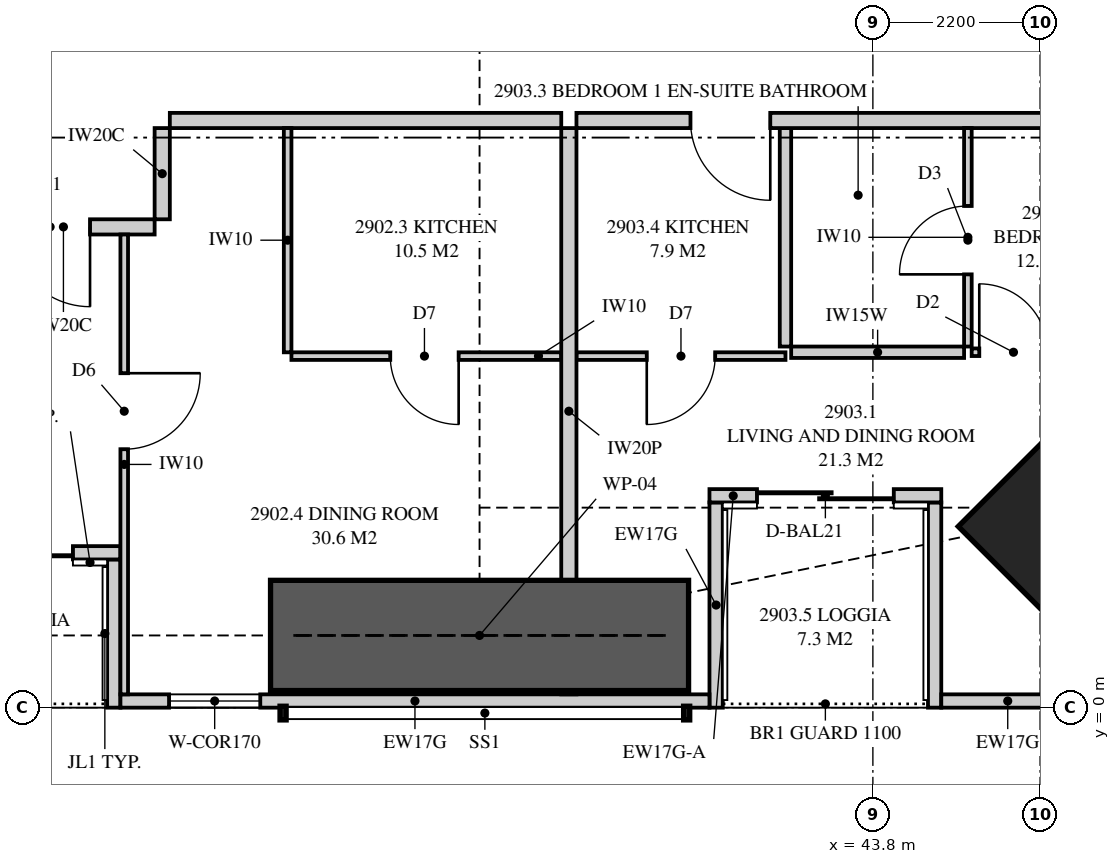
"""IFC4 building model, lengths in metres.
Left out: names, types, materials, properties, quantities, classifications, styles, units other than length and angle.
Written with IfcOpenShell. Run it as: python <this file> out.ifc"""

import sys

from ifc_helpers import new_model, si_unit, direction, frame, frame_2d, origin, origin_2d, place, context, subcontext, project, spatial, polyline, rectangle, outline, extrude, element, fill, save


model = new_model("IFC4")
c1 = context("Model", 3, precision=1e-05, world=origin(), true_north=direction((0.0, 1.0)))
c2 = subcontext(c1, "Body", "Model", "MODEL_VIEW")
j1 = project(units=[si_unit("LENGTHUNIT", "METRE"), si_unit("PLANEANGLEUNIT", "RADIAN")], contexts=[c1])
p1 = place(None, origin())
s1 = spatial("IfcSite", under=j1, at=p1, CompositionType="ELEMENT")
p2 = place(p1, origin())
s2 = spatial("IfcBuilding", under=s1, at=p2, CompositionType="ELEMENT")
p3 = place(p2, frame((0.0, 0.0, 108.2)))
s3 = spatial("IfcBuildingStorey", under=s2, at=p3, CompositionType="ELEMENT", Elevation=108.2)
p4 = place(p3, frame((46.869, 2.631, 0.0), z_axis=(0.0, 0.0, 1.0), x_axis=(-0.707106781187, 0.707106781187, 0.0)))
e1 = element("IfcColumn", 1, at=p4, inside=s3, PredefinedType="COLUMN", context=c2, shape_type="SweptSolid", body=[
    extrude(rectangle(XDim=2.4, YDim=3.1, at=origin_2d()), origin(), (0.0, 0.0, 1.0), 3.35),
])
p5 = place(p3, frame((33.9, 0.087, 0.0), z_axis=(0.0, 0.0, 1.0), x_axis=(1.0, 0.0, 0.0)))
e2 = element("IfcWall", 2, at=p5, inside=s3, PredefinedType="SOLIDWALL", context=c2, shape_type="SweptSolid", body=[
    extrude(outline(polyline([(0.0, 0.0), (7.75, 0.0), (7.75, 3.11), (4.928, 3.11), (4.928, 2.15), (4.883, 2.15), (4.883, 3.11), (4.725, 3.11), (4.725, 2.15), (0.0, 2.15), (0.0, 0.0)])), frame((0.0, 0.087, 0.0), z_axis=(0.0, -1.0, 0.0), x_axis=(1.0, 0.0, 0.0)), (0.0, 0.0, 1.0), 0.175),
])
p6 = place(p5, frame((0.64, 0.0, 0.4)))
e3 = element("IfcOpeningElement", 3, at=p6, cuts=e2, PredefinedType="OPENING", context=c2, shape_type="SweptSolid", body=[
    extrude(rectangle(XDim=1.2, YDim=1.7, at=frame_2d((0.6, 0.85))), frame((0.0, 0.097, 0.0), z_axis=(0.0, -1.0, 0.0), x_axis=(1.0, 0.0, 0.0)), (0.0, 0.0, 1.0), 0.195),
])
p7 = place(p3, frame((44.7, 0.087, 0.0), z_axis=(0.0, 0.0, 1.0), x_axis=(1.0, 0.0, 0.0)))
e4 = element("IfcWall", 4, at=p7, inside=s3, PredefinedType="SOLIDWALL", context=c2, shape_type="SweptSolid", body=[
    extrude(rectangle(XDim=1.749, YDim=0.175, at=frame_2d((0.875, 0.0))), origin(), (0.0, 0.0, 1.0), 3.11),
])
p8 = place(p3, frame((30.85, 2.038, 0.0), z_axis=(0.0, 0.0, 1.0), x_axis=(1.0, 0.0, 0.0)))
e5 = element("IfcWall", 5, at=p8, inside=s3, PredefinedType="SOLIDWALL", context=c2, shape_type="SweptSolid", body=[
    extrude(rectangle(XDim=3.05, YDim=0.175, at=frame_2d((1.525, 0.0))), origin(), (0.0, 0.0, 1.0), 3.11),
])
p9 = place(p8, frame((0.625, 0.0, 0.0)))
e6 = element("IfcOpeningElement", 6, at=p9, cuts=e5, PredefinedType="OPENING", context=c2, shape_type="SweptSolid", body=[
    extrude(rectangle(XDim=1.8, YDim=2.1, at=frame_2d((0.9, 1.05))), frame((0.0, 0.097, 0.0), z_axis=(0.0, -1.0, 0.0), x_axis=(1.0, 0.0, 0.0)), (0.0, 0.0, 1.0), 0.195),
])
p10 = place(p3, frame((33.812, 0.0, 0.0), z_axis=(0.0, 0.0, 1.0), x_axis=(0.0, 1.0, 0.0)))
e7 = element("IfcWall", 7, at=p10, inside=s3, PredefinedType="SOLIDWALL", context=c2, shape_type="SweptSolid", body=[
    extrude(outline(polyline([(0.0, 0.0), (1.95, 0.0), (1.95, 3.11), (1.75, 3.11), (1.75, 2.15), (0.15, 2.15), (0.15, 3.11), (0.0, 3.11), (0.0, 0.0)])), frame((0.0, 0.087, 0.0), z_axis=(0.0, -1.0, 0.0), x_axis=(1.0, 0.0, 0.0)), (0.0, 0.0, 1.0), 0.175),
])
p11 = place(p3, frame((41.65, 2.788, 0.0), z_axis=(0.0, 0.0, 1.0), x_axis=(1.0, 0.0, 0.0)))
e8 = element("IfcWall", 8, at=p11, inside=s3, PredefinedType="SOLIDWALL", context=c2, shape_type="SweptSolid", body=[
    extrude(rectangle(XDim=0.625, YDim=0.175, at=frame_2d((0.312, 0.0))), origin(), (0.0, 0.0, 1.0), 2.51),
])
p12 = place(p3, frame((42.275, 2.788, 0.0), z_axis=(0.0, 0.0, 1.0), x_axis=(1.0, 0.0, 0.0)))
e9 = element("IfcWall", 9, at=p12, inside=s3, PredefinedType="SOLIDWALL", context=c2, shape_type="SweptSolid", body=[
    extrude(rectangle(XDim=2.425, YDim=0.175, at=frame_2d((1.212, 0.0))), origin(), (0.0, 0.0, 1.0), 2.15),
])
p13 = place(p12, origin())
e10 = element("IfcOpeningElement", 10, at=p13, cuts=e9, PredefinedType="OPENING", context=c2, shape_type="SweptSolid", body=[
    extrude(rectangle(XDim=1.8, YDim=2.1, at=frame_2d((0.9, 1.05))), frame((0.0, 0.097, 0.0), z_axis=(0.0, -1.0, 0.0), x_axis=(1.0, 0.0, 0.0)), (0.0, 0.0, 1.0), 0.195),
])
p14 = place(p3, frame((41.738, 0.0, 0.0), z_axis=(0.0, 0.0, 1.0), x_axis=(0.0, 1.0, 0.0)))
e11 = element("IfcWall", 11, at=p14, inside=s3, PredefinedType="SOLIDWALL", context=c2, shape_type="SweptSolid", body=[
    extrude(outline(polyline([(0.0, 0.0), (2.7, 0.0), (2.7, 2.51), (2.419, 2.51), (2.419, 2.15), (0.75, 2.15), (0.75, 3.11), (0.0, 3.11), (0.0, 0.0)])), frame((0.0, 0.087, 0.0), z_axis=(0.0, -1.0, 0.0), x_axis=(1.0, 0.0, 0.0)), (0.0, 0.0, 1.0), 0.175),
])
p15 = place(p3, frame((44.613, 0.0, 0.0), z_axis=(0.0, 0.0, 1.0), x_axis=(0.0, 1.0, 0.0)))
e12 = element("IfcWall", 12, at=p15, inside=s3, PredefinedType="SOLIDWALL", context=c2, shape_type="SweptSolid", body=[
    extrude(outline(polyline([(0.0, 0.0), (2.7, 0.0), (2.7, 2.15), (1.337, 2.15), (1.337, 3.11), (0.0, 3.11), (0.0, 0.0)])), frame((0.0, 0.087, 0.0), z_axis=(0.0, -1.0, 0.0), x_axis=(1.0, 0.0, 0.0)), (0.0, 0.0, 1.0), 0.175),
])
p16 = place(p3, frame((39.8, 0.175, 0.0), z_axis=(0.0, 0.0, 1.0), x_axis=(0.0, 1.0, 0.0)))
e13 = element("IfcWall", 13, at=p16, inside=s3, PredefinedType="PARTITIONING", context=c2, shape_type="SweptSolid", body=[
    extrude(outline(polyline([(0.086, 3.11), (0.0, 3.11), (0.0, 0.0), (0.529, 0.0), (0.529, 0.701), (1.021, 0.701), (1.021, 0.0), (7.45, 0.0), (7.45, 3.11), (3.766, 3.11), (3.766, 2.51), (1.943, 2.51), (1.943, 2.15), (1.021, 2.15), (1.021, 1.449), (0.529, 1.449), (0.529, 2.15), (0.086, 2.15), (0.086, 3.11)])), frame((0.0, 0.1, 0.0), z_axis=(0.0, -1.0, 0.0), x_axis=(1.0, 0.0, 0.0)), (0.0, 0.0, 1.0), 0.2),
])
p17 = place(p3, frame((36.15, 4.625, 0.0), z_axis=(0.0, 0.0, 1.0), x_axis=(1.0, 0.0, 0.0)))
e14 = element("IfcWall", 14, at=p17, inside=s3, PredefinedType="PARTITIONING", context=c2, shape_type="SweptSolid", body=[
    extrude(outline(polyline([(0.0, 0.0), (3.55, 0.0), (3.55, 3.11), (2.762, 3.11), (2.762, 2.541), (2.188, 2.541), (2.188, 3.11), (0.0, 3.11), (0.0, 0.0)])), frame((0.0, 0.05, 0.0), z_axis=(0.0, -1.0, 0.0), x_axis=(1.0, 0.0, 0.0)), (0.0, 0.0, 1.0), 0.1),
])
p18 = place(p17, frame((1.3, 0.0, 0.0)))
e15 = element("IfcOpeningElement", 15, at=p18, cuts=e14, PredefinedType="OPENING", context=c2, shape_type="SweptSolid", body=[
    extrude(rectangle(XDim=0.9, YDim=2.1, at=frame_2d((0.45, 1.05))), frame((0.0, 0.06, 0.0), z_axis=(0.0, -1.0, 0.0), x_axis=(1.0, 0.0, 0.0)), (0.0, 0.0, 1.0), 0.12),
])
p19 = place(p3, frame((36.1, 4.675, 0.0), z_axis=(0.0, 0.0, 1.0), x_axis=(0.0, 1.0, 0.0)))
e16 = element("IfcWall", 16, at=p19, inside=s3, PredefinedType="PARTITIONING", context=c2, shape_type="SweptSolid", body=[
    extrude(rectangle(XDim=2.95, YDim=0.1, at=frame_2d((1.475, 0.0))), origin(), (0.0, 0.0, 1.0), 3.11),
])
p20 = place(p3, frame((33.95, 0.175, 0.0), z_axis=(0.0, 0.0, 1.0), x_axis=(0.0, 1.0, 0.0)))
e17 = element("IfcWall", 17, at=p20, inside=s3, PredefinedType="PARTITIONING", context=c2, shape_type="SweptSolid", body=[
    extrude(outline(polyline([(0.0, 0.0), (6.05, 0.0), (6.05, 3.11), (1.635, 3.11), (1.635, 2.15), (0.0, 2.15), (0.0, 3.11), (0.0, 0.0)])), frame((0.0, 0.05, 0.0), z_axis=(0.0, -1.0, 0.0), x_axis=(1.0, 0.0, 0.0)), (0.0, 0.0, 1.0), 0.1),
])
p21 = place(p20, frame((3.225, 0.0, 0.0)))
e18 = element("IfcOpeningElement", 18, at=p21, cuts=e17, PredefinedType="OPENING", context=c2, shape_type="SweptSolid", body=[
    extrude(rectangle(XDim=1.0, YDim=2.1, at=frame_2d((0.5, 1.05))), frame((0.0, 0.06, 0.0), z_axis=(0.0, -1.0, 0.0), x_axis=(1.0, 0.0, 0.0)), (0.0, 0.0, 1.0), 0.12),
])
p22 = place(p3, frame((39.9, 7.725, 0.0), z_axis=(0.0, 0.0, 1.0), x_axis=(1.0, 0.0, 0.0)))
e19 = element("IfcWall", 19, at=p22, inside=s3, PredefinedType="PARTITIONING", context=c2, shape_type="SweptSolid", body=[
    extrude(rectangle(XDim=6.125, YDim=0.2, at=frame_2d((3.062, 0.0))), origin(), (0.0, 0.0, 1.0), 3.11),
])
p23 = place(p22, frame((1.5, 0.0, 0.0)))
e20 = element("IfcOpeningElement", 20, at=p23, cuts=e19, PredefinedType="OPENING", context=c2, shape_type="SweptSolid", body=[
    extrude(rectangle(XDim=1.05, YDim=2.2, at=frame_2d((0.525, 1.1))), frame((0.0, 0.11, 0.0), z_axis=(0.0, -1.0, 0.0), x_axis=(1.0, 0.0, 0.0)), (0.0, 0.0, 1.0), 0.22),
])
p24 = place(p3, frame((45.05, 4.751, 0.0), z_axis=(0.0, 0.0, 1.0), x_axis=(0.0, 1.0, 0.0)))
e21 = element("IfcWall", 21, at=p24, inside=s3, PredefinedType="PARTITIONING", context=c2, shape_type="SweptSolid", body=[
    extrude(rectangle(XDim=2.874, YDim=0.1, at=frame_2d((1.437, 0.0))), origin(), (0.0, 0.0, 1.0), 3.11),
])
p25 = place(p24, frame((0.949, 0.0, 0.0)))
e22 = element("IfcOpeningElement", 22, at=p25, cuts=e21, PredefinedType="OPENING", context=c2, shape_type="SweptSolid", body=[
    extrude(rectangle(XDim=0.9, YDim=2.1, at=frame_2d((0.45, 1.05))), frame((0.0, 0.06, 0.0), z_axis=(0.0, -1.0, 0.0), x_axis=(1.0, 0.0, 0.0)), (0.0, 0.0, 1.0), 0.12),
])
p26 = place(p3, frame((45.1, 4.676, 0.0), z_axis=(0.0, 0.0, 1.0), x_axis=(1.0, 0.0, 0.0)))
e23 = element("IfcWall", 23, at=p26, inside=s3, PredefinedType="PARTITIONING", context=c2, shape_type="SweptSolid", body=[
    extrude(outline(polyline([(0.0, 0.0), (4.4, 0.0), (4.4, 3.11), (2.971, 3.11), (2.971, 2.15), (1.229, 2.15), (1.229, 3.11), (0.0, 3.11), (0.0, 0.0)])), frame((0.0, 0.05, 0.0), z_axis=(0.0, -1.0, 0.0), x_axis=(1.0, 0.0, 0.0)), (0.0, 0.0, 1.0), 0.1),
])
p27 = place(p26, frame((0.1, 0.0, 0.0)))
e24 = element("IfcOpeningElement", 24, at=p27, cuts=e23, PredefinedType="OPENING", context=c2, shape_type="SweptSolid", body=[
    extrude(rectangle(XDim=0.9, YDim=2.1, at=frame_2d((0.45, 1.05))), frame((0.0, 0.06, 0.0), z_axis=(0.0, -1.0, 0.0), x_axis=(1.0, 0.0, 0.0)), (0.0, 0.0, 1.0), 0.12),
])
p28 = place(p3, frame((42.725, 4.676, 0.0), z_axis=(0.0, 0.0, 1.0), x_axis=(1.0, 0.0, 0.0)))
e25 = element("IfcWall", 25, at=p28, inside=s3, PredefinedType="PLUMBINGWALL", context=c2, shape_type="SweptSolid", body=[
    extrude(rectangle(XDim=2.275, YDim=0.15, at=frame_2d((1.137, 0.0))), origin(), (0.0, 0.0, 1.0), 3.11),
])
p29 = place(p3, frame((42.65, 4.751, 0.0), z_axis=(0.0, 0.0, 1.0), x_axis=(0.0, 1.0, 0.0)))
e26 = element("IfcWall", 26, at=p29, inside=s3, PredefinedType="PLUMBINGWALL", context=c2, shape_type="SweptSolid", body=[
    extrude(rectangle(XDim=2.874, YDim=0.15, at=frame_2d((1.437, 0.0))), origin(), (0.0, 0.0, 1.0), 3.11),
])
p30 = place(p3, frame((39.9, 4.625, 0.0), z_axis=(0.0, 0.0, 1.0), x_axis=(1.0, 0.0, 0.0)))
e27 = element("IfcWall", 27, at=p30, inside=s3, PredefinedType="PARTITIONING", context=c2, shape_type="SweptSolid", body=[
    extrude(rectangle(XDim=2.75, YDim=0.1, at=frame_2d((1.375, 0.0))), origin(), (0.0, 0.0, 1.0), 3.11),
])
p31 = place(p30, frame((0.925, 0.0, 0.0)))
e28 = element("IfcOpeningElement", 28, at=p31, cuts=e27, PredefinedType="OPENING", context=c2, shape_type="SweptSolid", body=[
    extrude(rectangle(XDim=0.9, YDim=2.1, at=frame_2d((0.45, 1.05))), frame((0.0, 0.06, 0.0), z_axis=(0.0, -1.0, 0.0), x_axis=(1.0, 0.0, 0.0)), (0.0, 0.0, 1.0), 0.12),
])
p32 = place(p3, frame((34.55, 7.725, 0.0), z_axis=(0.0, 0.0, 1.0), x_axis=(1.0, 0.0, 0.0)))
e29 = element("IfcWall", 29, at=p32, inside=s3, PredefinedType="PARTITIONING", context=c2, shape_type="SweptSolid", body=[
    extrude(outline(polyline([(0.0, 0.0), (5.15, 0.0), (5.15, 3.11), (4.412, 3.11), (4.412, 2.541), (3.738, 2.541), (3.738, 3.11), (0.0, 3.11), (0.0, 0.0)])), frame((0.0, 0.1, 0.0), z_axis=(0.0, -1.0, 0.0), x_axis=(1.0, 0.0, 0.0)), (0.0, 0.0, 1.0), 0.2),
])
p33 = place(p3, frame((31.95, 6.325, 0.0), z_axis=(0.0, 0.0, 1.0), x_axis=(1.0, 0.0, 0.0)))
e30 = element("IfcWall", 30, at=p33, inside=s3, PredefinedType="PARTITIONING", context=c2, shape_type="SweptSolid", body=[
    extrude(rectangle(XDim=2.4, YDim=0.2, at=frame_2d((1.2, 0.0))), origin(), (0.0, 0.0, 1.0), 3.11),
])
p34 = place(p33, frame((0.5, 0.0, 0.0)))
e31 = element("IfcOpeningElement", 31, at=p34, cuts=e30, PredefinedType="OPENING", context=c2, shape_type="SweptSolid", body=[
    extrude(rectangle(XDim=1.05, YDim=2.2, at=frame_2d((0.525, 1.1))), frame((0.0, 0.11, 0.0), z_axis=(0.0, -1.0, 0.0), x_axis=(1.0, 0.0, 0.0)), (0.0, 0.0, 1.0), 0.22),
])
p35 = place(p3, frame((34.45, 7.625, 0.0), z_axis=(0.0, 0.0, 1.0), x_axis=(0.0, -1.0, 0.0)))
e32 = element("IfcWall", 32, at=p35, inside=s3, PredefinedType="PARTITIONING", context=c2, shape_type="SweptSolid", body=[
    extrude(rectangle(XDim=1.2, YDim=0.2, at=frame_2d((0.6, 0.0))), origin(), (0.0, 0.0, 1.0), 3.11),
])
p36 = place(p3, frame((35.875, 0.95, 0.0), z_axis=(0.0, 0.0, 1.0), x_axis=(1.0, 0.0, 0.0)))
e33 = element("IfcWall", 33, at=p36, inside=s3, PredefinedType="SHEAR", context=c2, shape_type="SweptSolid", body=[
    extrude(rectangle(XDim=5.5, YDim=1.45, at=frame_2d((2.75, 0.0))), origin(), (0.0, 0.0, 1.0), 3.35),
])
p37 = place(p9, origin())
e34 = element("IfcDoor", 34, at=p37, inside=s3, OperationType="SLIDING_TO_LEFT", PredefinedType="DOOR", context=c2, shape_type="SweptSolid", body=[
    extrude(rectangle(XDim=1.8, YDim=2.1, at=frame_2d((0.9, 1.05))), frame((0.0, 0.025, 0.0), z_axis=(0.0, -1.0, 0.0), x_axis=(1.0, 0.0, 0.0)), (0.0, 0.0, 1.0), 0.05),
])
fill(e6, e34)
p38 = place(p6, origin())
e35 = element("IfcWindow", 35, at=p38, inside=s3, PartitioningType="SINGLE_PANEL", PredefinedType="WINDOW", context=c2, shape_type="SweptSolid", body=[
    extrude(rectangle(XDim=1.2, YDim=1.7, at=frame_2d((0.6, 0.85))), frame((0.0, 0.03, 0.0), z_axis=(0.0, -1.0, 0.0), x_axis=(1.0, 0.0, 0.0)), (0.0, 0.0, 1.0), 0.06),
])
fill(e3, e35)
p39 = place(p13, origin())
e36 = element("IfcDoor", 36, at=p39, inside=s3, OperationType="SLIDING_TO_LEFT", PredefinedType="DOOR", context=c2, shape_type="SweptSolid", body=[
    extrude(rectangle(XDim=1.8, YDim=2.1, at=frame_2d((0.9, 1.05))), frame((0.0, 0.025, 0.0), z_axis=(0.0, -1.0, 0.0), x_axis=(1.0, 0.0, 0.0)), (0.0, 0.0, 1.0), 0.05),
])
fill(e10, e36)
p40 = place(p34, frame((1.05, 0.0, 0.0), z_axis=(0.0, 0.0, 1.0), x_axis=(-1.0, 0.0, 0.0)))
e37 = element("IfcDoor", 37, at=p40, inside=s3, OperationType="SINGLE_SWING_LEFT", PredefinedType="DOOR", context=c2, shape_type="SweptSolid", body=[
    extrude(rectangle(XDim=1.05, YDim=2.2, at=frame_2d((0.525, 1.1))), frame((0.0, 0.025, 0.0), z_axis=(0.0, -1.0, 0.0), x_axis=(1.0, 0.0, 0.0)), (0.0, 0.0, 1.0), 0.05),
])
fill(e31, e37)
p41 = place(p18, frame((0.9, 0.0, 0.0), z_axis=(0.0, 0.0, 1.0), x_axis=(-1.0, 0.0, 0.0)))
e38 = element("IfcDoor", 38, at=p41, inside=s3, OperationType="SINGLE_SWING_LEFT", PredefinedType="DOOR", context=c2, shape_type="SweptSolid", body=[
    extrude(rectangle(XDim=0.9, YDim=2.1, at=frame_2d((0.45, 1.05))), frame((0.0, 0.025, 0.0), z_axis=(0.0, -1.0, 0.0), x_axis=(1.0, 0.0, 0.0)), (0.0, 0.0, 1.0), 0.05),
])
fill(e15, e38)
p42 = place(p21, frame((1.0, 0.0, 0.0), z_axis=(0.0, 0.0, 1.0), x_axis=(-1.0, 0.0, 0.0)))
e39 = element("IfcDoor", 39, at=p42, inside=s3, OperationType="SINGLE_SWING_LEFT", PredefinedType="DOOR", context=c2, shape_type="SweptSolid", body=[
    extrude(rectangle(XDim=1.0, YDim=2.1, at=frame_2d((0.5, 1.05))), frame((0.0, 0.025, 0.0), z_axis=(0.0, -1.0, 0.0), x_axis=(1.0, 0.0, 0.0)), (0.0, 0.0, 1.0), 0.05),
])
fill(e18, e39)
p43 = place(p23, frame((1.05, 0.0, 0.0), z_axis=(0.0, 0.0, 1.0), x_axis=(-1.0, 0.0, 0.0)))
e40 = element("IfcDoor", 40, at=p43, inside=s3, OperationType="SINGLE_SWING_LEFT", PredefinedType="DOOR", context=c2, shape_type="SweptSolid", body=[
    extrude(rectangle(XDim=1.05, YDim=2.2, at=frame_2d((0.525, 1.1))), frame((0.0, 0.025, 0.0), z_axis=(0.0, -1.0, 0.0), x_axis=(1.0, 0.0, 0.0)), (0.0, 0.0, 1.0), 0.05),
])
fill(e20, e40)
p44 = place(p27, origin())
e41 = element("IfcDoor", 41, at=p44, inside=s3, OperationType="SINGLE_SWING_LEFT", PredefinedType="DOOR", context=c2, shape_type="SweptSolid", body=[
    extrude(rectangle(XDim=0.9, YDim=2.1, at=frame_2d((0.45, 1.05))), frame((0.0, 0.025, 0.0), z_axis=(0.0, -1.0, 0.0), x_axis=(1.0, 0.0, 0.0)), (0.0, 0.0, 1.0), 0.05),
])
fill(e24, e41)
p45 = place(p25, origin())
e42 = element("IfcDoor", 42, at=p45, inside=s3, OperationType="SINGLE_SWING_LEFT", PredefinedType="DOOR", context=c2, shape_type="SweptSolid", body=[
    extrude(rectangle(XDim=0.9, YDim=2.1, at=frame_2d((0.45, 1.05))), frame((0.0, 0.025, 0.0), z_axis=(0.0, -1.0, 0.0), x_axis=(1.0, 0.0, 0.0)), (0.0, 0.0, 1.0), 0.05),
])
fill(e22, e42)
p46 = place(p31, frame((0.9, 0.0, 0.0), z_axis=(0.0, 0.0, 1.0), x_axis=(-1.0, 0.0, 0.0)))
e43 = element("IfcDoor", 43, at=p46, inside=s3, OperationType="SINGLE_SWING_RIGHT", PredefinedType="DOOR", context=c2, shape_type="SweptSolid", body=[
    extrude(rectangle(XDim=0.9, YDim=2.1, at=frame_2d((0.45, 1.05))), frame((0.0, 0.025, 0.0), z_axis=(0.0, -1.0, 0.0), x_axis=(1.0, 0.0, 0.0)), (0.0, 0.0, 1.0), 0.05),
])
fill(e28, e43)
save(model, sys.argv[1])
